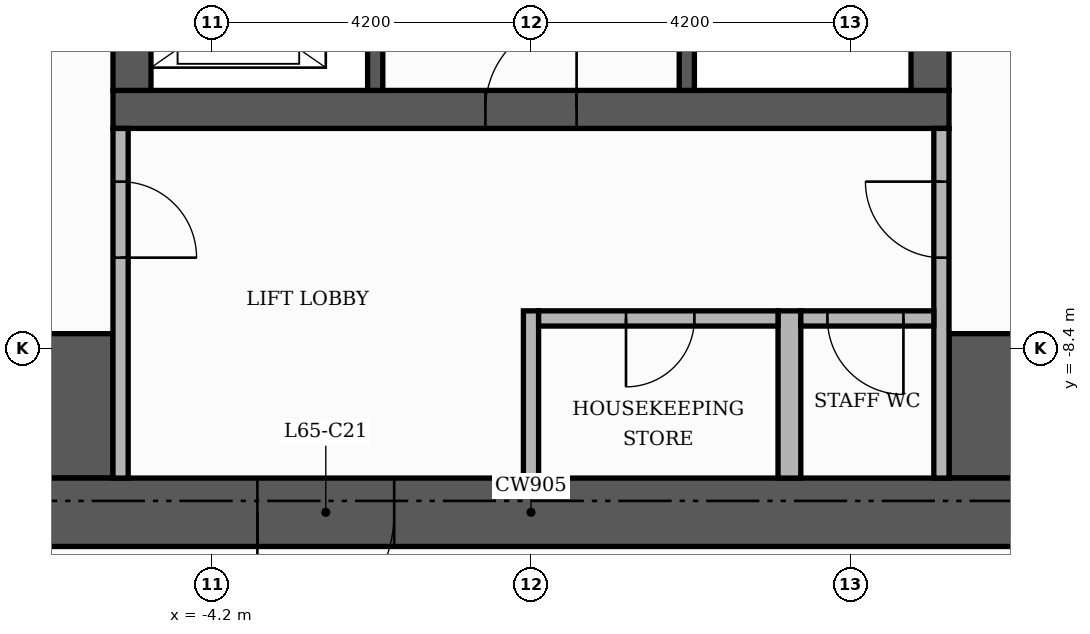
"""IFC4 building model, lengths in metres.
Left out: names, types, materials, properties, quantities, classifications, styles, units other than length and angle.
Written with IfcOpenShell. Run it as: python <this file> out.ifc"""

import sys

from ifc_helpers import new_model, si_unit, direction, frame, frame_2d, origin, place, context, subcontext, project, spatial, rectangle, extrude, element, fill, save


model = new_model("IFC4")
c1 = context("Model", 3, precision=1e-05, world=origin(), true_north=direction((0.0, 1.0)))
c2 = subcontext(c1, "Body", "Model", "MODEL_VIEW")
j1 = project(units=[si_unit("LENGTHUNIT", "METRE"), si_unit("PLANEANGLEUNIT", "RADIAN")], contexts=[c1])
p1 = place(None, origin())
s1 = spatial("IfcSite", under=j1, at=p1, CompositionType="ELEMENT")
p2 = place(p1, origin())
s2 = spatial("IfcBuilding", under=s1, at=p2, CompositionType="ELEMENT")
p3 = place(p2, frame((0.0, 0.0, 271.8)))
s3 = spatial("IfcBuildingStorey", under=s2, at=p3, CompositionType="ELEMENT", Elevation=271.8)
p4 = place(p3, frame((-5.5, -5.25, 0.0), z_axis=(0.0, 0.0, 1.0), x_axis=(1.0, 0.0, 0.0)))
e1 = element("IfcWall", 1, at=p4, inside=s3, PredefinedType="SHEAR", context=c2, shape_type="SweptSolid", body=[
    extrude(rectangle(XDim=11.0, YDim=0.5, at=frame_2d((5.5, 0.0))), origin(), (0.0, 0.0, 1.0), 3.48),
])
p5 = place(p4, frame((4.9, 0.0, 0.0)))
e2 = element("IfcOpeningElement", 2, at=p5, cuts=e1, PredefinedType="OPENING", context=c2, shape_type="SweptSolid", body=[
    extrude(rectangle(XDim=1.2, YDim=2.1, at=frame_2d((0.6, 1.05))), frame((0.0, 0.26, 0.0), z_axis=(0.0, -1.0, 0.0), x_axis=(1.0, 0.0, 0.0)), (0.0, 0.0, 1.0), 0.52),
])
for number, where, z_axis, x_axis in (
    (3, (-5.25, -5.0, 0.0), (0.0, 0.0, 1.0), (0.0, 1.0, 0.0)),
    (4, (5.25, -5.0, 0.0), (0.0, 0.0, 1.0), (0.0, 1.0, 0.0)),
):
    element("IfcWall", number, at=place(p3, frame(where, z_axis=z_axis, x_axis=x_axis)), inside=s3, PredefinedType="SHEAR", context=c2, shape_type="SweptSolid", body=[
        extrude(rectangle(XDim=10.5, YDim=0.5, at=frame_2d((5.25, 0.0))), origin(), (0.0, 0.0, 1.0), 3.48),
    ])
for number, where, z_axis, x_axis in (
    (5, (-10.1, -9.15, 0.0), (0.0, 0.0, 1.0), (1.0, 0.0, 0.0)),
    (6, (5.5, -9.15, 0.0), (0.0, 0.0, 1.0), (1.0, 0.0, 0.0)),
):
    element("IfcWall", number, at=place(p3, frame(where, z_axis=z_axis, x_axis=x_axis)), inside=s3, PredefinedType="SHEAR", context=c2, shape_type="SweptSolid", body=[
        extrude(rectangle(XDim=4.6, YDim=1.9, at=frame_2d((2.3, 0.0))), origin(), (0.0, 0.0, 1.0), 3.48),
    ])
p6 = place(p3, frame((2.05, -5.0, 0.0), z_axis=(0.0, 0.0, 1.0), x_axis=(0.0, 1.0, 0.0)))
e7 = element("IfcWall", 7, at=p6, inside=s3, PredefinedType="SHEAR", context=c2, shape_type="SweptSolid", body=[
    extrude(rectangle(XDim=6.6, YDim=0.2, at=frame_2d((3.3, 0.0))), origin(), (0.0, 0.0, 1.0), 3.48),
])
p7 = place(p6, frame((5.25, 0.0, 0.0)))
e8 = element("IfcOpeningElement", 8, at=p7, cuts=e7, PredefinedType="OPENING", context=c2, shape_type="SweptSolid", body=[
    extrude(rectangle(XDim=1.0, YDim=2.1, at=frame_2d((0.5, 1.05))), frame((0.0, 0.11, 0.0), z_axis=(0.0, -1.0, 0.0), x_axis=(1.0, 0.0, 0.0)), (0.0, 0.0, 1.0), 0.22),
])
p8 = place(p3, frame((-2.05, -5.0, 0.0), z_axis=(0.0, 0.0, 1.0), x_axis=(0.0, 1.0, 0.0)))
e9 = element("IfcWall", 9, at=p8, inside=s3, PredefinedType="SHEAR", context=c2, shape_type="SweptSolid", body=[
    extrude(rectangle(XDim=3.4, YDim=0.2, at=frame_2d((1.7, 0.0))), origin(), (0.0, 0.0, 1.0), 3.48),
])
p9 = place(p8, frame((0.55, 0.0, 0.0)))
e10 = element("IfcOpeningElement", 10, at=p9, cuts=e9, PredefinedType="OPENING", context=c2, shape_type="SweptSolid", body=[
    extrude(rectangle(XDim=1.1, YDim=2.1, at=frame_2d((0.55, 1.05))), frame((0.0, 0.11, 0.0), z_axis=(0.0, -1.0, 0.0), x_axis=(1.0, 0.0, 0.0)), (0.0, 0.0, 1.0), 0.22),
])
p10 = place(p8, frame((2.45, 0.0, 0.0)))
e11 = element("IfcOpeningElement", 11, at=p10, cuts=e9, PredefinedType="OPENING", context=c2, shape_type="SweptSolid", body=[
    extrude(rectangle(XDim=0.8, YDim=2.1, at=frame_2d((0.4, 1.05))), frame((0.0, 0.11, 0.0), z_axis=(0.0, -1.0, 0.0), x_axis=(1.0, 0.0, 0.0)), (0.0, 0.0, 1.0), 0.22),
])
p11 = place(p3, frame((-11.0, -10.55, 0.0), z_axis=(0.0, 0.0, 1.0), x_axis=(1.0, 0.0, 0.0)))
e12 = element("IfcWall", 12, at=p11, inside=s3, PredefinedType="SHEAR", context=c2, shape_type="SweptSolid", body=[
    extrude(rectangle(XDim=22.0, YDim=0.9, at=frame_2d((11.0, 0.0))), origin(), (0.0, 0.0, 1.0), 3.48),
])
p12 = place(p11, frame((7.4, 0.0, 0.0)))
e13 = element("IfcOpeningElement", 13, at=p12, cuts=e12, PredefinedType="OPENING", context=c2, shape_type="SweptSolid", body=[
    extrude(rectangle(XDim=1.8, YDim=2.2, at=frame_2d((0.9, 1.1))), frame((0.0, 0.46, 0.0), z_axis=(0.0, -1.0, 0.0), x_axis=(1.0, 0.0, 0.0)), (0.0, 0.0, 1.0), 0.92),
])
p13 = place(p3, frame((-5.4, -10.1, 0.0), z_axis=(0.0, 0.0, 1.0), x_axis=(0.0, 1.0, 0.0)))
e14 = element("IfcWall", 14, at=p13, inside=s3, PredefinedType="PARTITIONING", context=c2, shape_type="SweptSolid", body=[
    extrude(rectangle(XDim=4.6, YDim=0.2, at=frame_2d((2.3, 0.0))), origin(), (0.0, 0.0, 1.0), 3.48),
])
p14 = place(p13, frame((2.9, 0.0, 0.0)))
e15 = element("IfcOpeningElement", 15, at=p14, cuts=e14, PredefinedType="OPENING", context=c2, shape_type="SweptSolid", body=[
    extrude(rectangle(XDim=1.0, YDim=2.1, at=frame_2d((0.5, 1.05))), frame((0.0, 0.11, 0.0), z_axis=(0.0, -1.0, 0.0), x_axis=(1.0, 0.0, 0.0)), (0.0, 0.0, 1.0), 0.22),
])
p15 = place(p3, frame((0.0, -10.1, 0.0), z_axis=(0.0, 0.0, 1.0), x_axis=(0.0, 1.0, 0.0)))
e16 = element("IfcWall", 16, at=p15, inside=s3, PredefinedType="PARTITIONING", context=c2, shape_type="SweptSolid", body=[
    extrude(rectangle(XDim=2.2, YDim=0.2, at=frame_2d((1.1, 0.0))), origin(), (0.0, 0.0, 1.0), 3.48),
])
p16 = place(p3, frame((3.4, -10.1, 0.0), z_axis=(0.0, 0.0, 1.0), x_axis=(0.0, 1.0, 0.0)))
e17 = element("IfcWall", 17, at=p16, inside=s3, PredefinedType="PARTITIONING", context=c2, shape_type="SweptSolid", body=[
    extrude(rectangle(XDim=2.2, YDim=0.3, at=frame_2d((1.1, 0.0))), origin(), (0.0, 0.0, 1.0), 3.48),
])
p17 = place(p3, frame((5.4, -10.1, 0.0), z_axis=(0.0, 0.0, 1.0), x_axis=(0.0, 1.0, 0.0)))
e18 = element("IfcWall", 18, at=p17, inside=s3, PredefinedType="PARTITIONING", context=c2, shape_type="SweptSolid", body=[
    extrude(rectangle(XDim=4.6, YDim=0.2, at=frame_2d((2.3, 0.0))), origin(), (0.0, 0.0, 1.0), 3.48),
])
p18 = place(p17, frame((2.9, 0.0, 0.0)))
e19 = element("IfcOpeningElement", 19, at=p18, cuts=e18, PredefinedType="OPENING", context=c2, shape_type="SweptSolid", body=[
    extrude(rectangle(XDim=1.0, YDim=2.1, at=frame_2d((0.5, 1.05))), frame((0.0, 0.11, 0.0), z_axis=(0.0, -1.0, 0.0), x_axis=(1.0, 0.0, 0.0)), (0.0, 0.0, 1.0), 0.22),
])
p19 = place(p3, frame((0.1, -8.0, 0.0), z_axis=(0.0, 0.0, 1.0), x_axis=(1.0, 0.0, 0.0)))
e20 = element("IfcWall", 20, at=p19, inside=s3, PredefinedType="PARTITIONING", context=c2, shape_type="SweptSolid", body=[
    extrude(rectangle(XDim=3.15, YDim=0.2, at=frame_2d((1.575, 0.0))), origin(), (0.0, 0.0, 1.0), 3.48),
])
p20 = place(p19, frame((1.15, 0.0, 0.0)))
e21 = element("IfcOpeningElement", 21, at=p20, cuts=e20, PredefinedType="OPENING", context=c2, shape_type="SweptSolid", body=[
    extrude(rectangle(XDim=0.9, YDim=2.1, at=frame_2d((0.45, 1.05))), frame((0.0, 0.11, 0.0), z_axis=(0.0, -1.0, 0.0), x_axis=(1.0, 0.0, 0.0)), (0.0, 0.0, 1.0), 0.22),
])
p21 = place(p3, frame((3.55, -8.0, 0.0), z_axis=(0.0, 0.0, 1.0), x_axis=(1.0, 0.0, 0.0)))
e22 = element("IfcWall", 22, at=p21, inside=s3, PredefinedType="PARTITIONING", context=c2, shape_type="SweptSolid", body=[
    extrude(rectangle(XDim=1.75, YDim=0.2, at=frame_2d((0.875, 0.0))), origin(), (0.0, 0.0, 1.0), 3.48),
])
p22 = place(p21, frame((0.35, 0.0, 0.0)))
e23 = element("IfcOpeningElement", 23, at=p22, cuts=e22, PredefinedType="OPENING", context=c2, shape_type="SweptSolid", body=[
    extrude(rectangle(XDim=1.0, YDim=2.1, at=frame_2d((0.5, 1.05))), frame((0.0, 0.11, 0.0), z_axis=(0.0, -1.0, 0.0), x_axis=(1.0, 0.0, 0.0)), (0.0, 0.0, 1.0), 0.22),
])
p23 = place(p5, origin())
e24 = element("IfcDoor", 24, at=p23, inside=s3, OperationType="SINGLE_SWING_RIGHT", PredefinedType="DOOR", context=c2, shape_type="SweptSolid", body=[
    extrude(rectangle(XDim=1.2, YDim=2.1, at=frame_2d((0.6, 1.05))), frame((0.0, 0.025, 0.0), z_axis=(0.0, -1.0, 0.0), x_axis=(1.0, 0.0, 0.0)), (0.0, 0.0, 1.0), 0.05),
])
fill(e2, e24)
p24 = place(p14, frame((1.0, 0.0, 0.0), z_axis=(0.0, 0.0, 1.0), x_axis=(-1.0, 0.0, 0.0)))
e25 = element("IfcDoor", 25, at=p24, inside=s3, OperationType="SINGLE_SWING_LEFT", PredefinedType="DOOR", context=c2, shape_type="SweptSolid", body=[
    extrude(rectangle(XDim=1.0, YDim=2.1, at=frame_2d((0.5, 1.05))), frame((0.0, 0.025, 0.0), z_axis=(0.0, -1.0, 0.0), x_axis=(1.0, 0.0, 0.0)), (0.0, 0.0, 1.0), 0.05),
])
fill(e15, e25)
p25 = place(p18, origin())
e26 = element("IfcDoor", 26, at=p25, inside=s3, OperationType="SINGLE_SWING_RIGHT", PredefinedType="DOOR", context=c2, shape_type="SweptSolid", body=[
    extrude(rectangle(XDim=1.0, YDim=2.1, at=frame_2d((0.5, 1.05))), frame((0.0, 0.025, 0.0), z_axis=(0.0, -1.0, 0.0), x_axis=(1.0, 0.0, 0.0)), (0.0, 0.0, 1.0), 0.05),
])
fill(e19, e26)
p26 = place(p12, frame((1.8, 0.0, 0.0), z_axis=(0.0, 0.0, 1.0), x_axis=(-1.0, 0.0, 0.0)))
e27 = element("IfcDoor", 27, at=p26, inside=s3, OperationType="DOUBLE_DOOR_SINGLE_SWING", PredefinedType="DOOR", context=c2, shape_type="SweptSolid", body=[
    extrude(rectangle(XDim=1.8, YDim=2.2, at=frame_2d((0.9, 1.1))), frame((0.0, 0.025, 0.0), z_axis=(0.0, -1.0, 0.0), x_axis=(1.0, 0.0, 0.0)), (0.0, 0.0, 1.0), 0.05),
])
fill(e13, e27)
p27 = place(p20, frame((0.9, 0.0, 0.0), z_axis=(0.0, 0.0, 1.0), x_axis=(-1.0, 0.0, 0.0)))
e28 = element("IfcDoor", 28, at=p27, inside=s3, OperationType="SINGLE_SWING_LEFT", PredefinedType="DOOR", context=c2, shape_type="SweptSolid", body=[
    extrude(rectangle(XDim=0.9, YDim=2.1, at=frame_2d((0.45, 1.05))), frame((0.0, 0.025, 0.0), z_axis=(0.0, -1.0, 0.0), x_axis=(1.0, 0.0, 0.0)), (0.0, 0.0, 1.0), 0.05),
])
fill(e21, e28)
p28 = place(p22, frame((1.0, 0.0, 0.0), z_axis=(0.0, 0.0, 1.0), x_axis=(-1.0, 0.0, 0.0)))
e29 = element("IfcDoor", 29, at=p28, inside=s3, OperationType="SINGLE_SWING_RIGHT", PredefinedType="DOOR", context=c2, shape_type="SweptSolid", body=[
    extrude(rectangle(XDim=1.0, YDim=2.1, at=frame_2d((0.5, 1.05))), frame((0.0, 0.025, 0.0), z_axis=(0.0, -1.0, 0.0), x_axis=(1.0, 0.0, 0.0)), (0.0, 0.0, 1.0), 0.05),
])
fill(e23, e29)
save(model, sys.argv[1])
